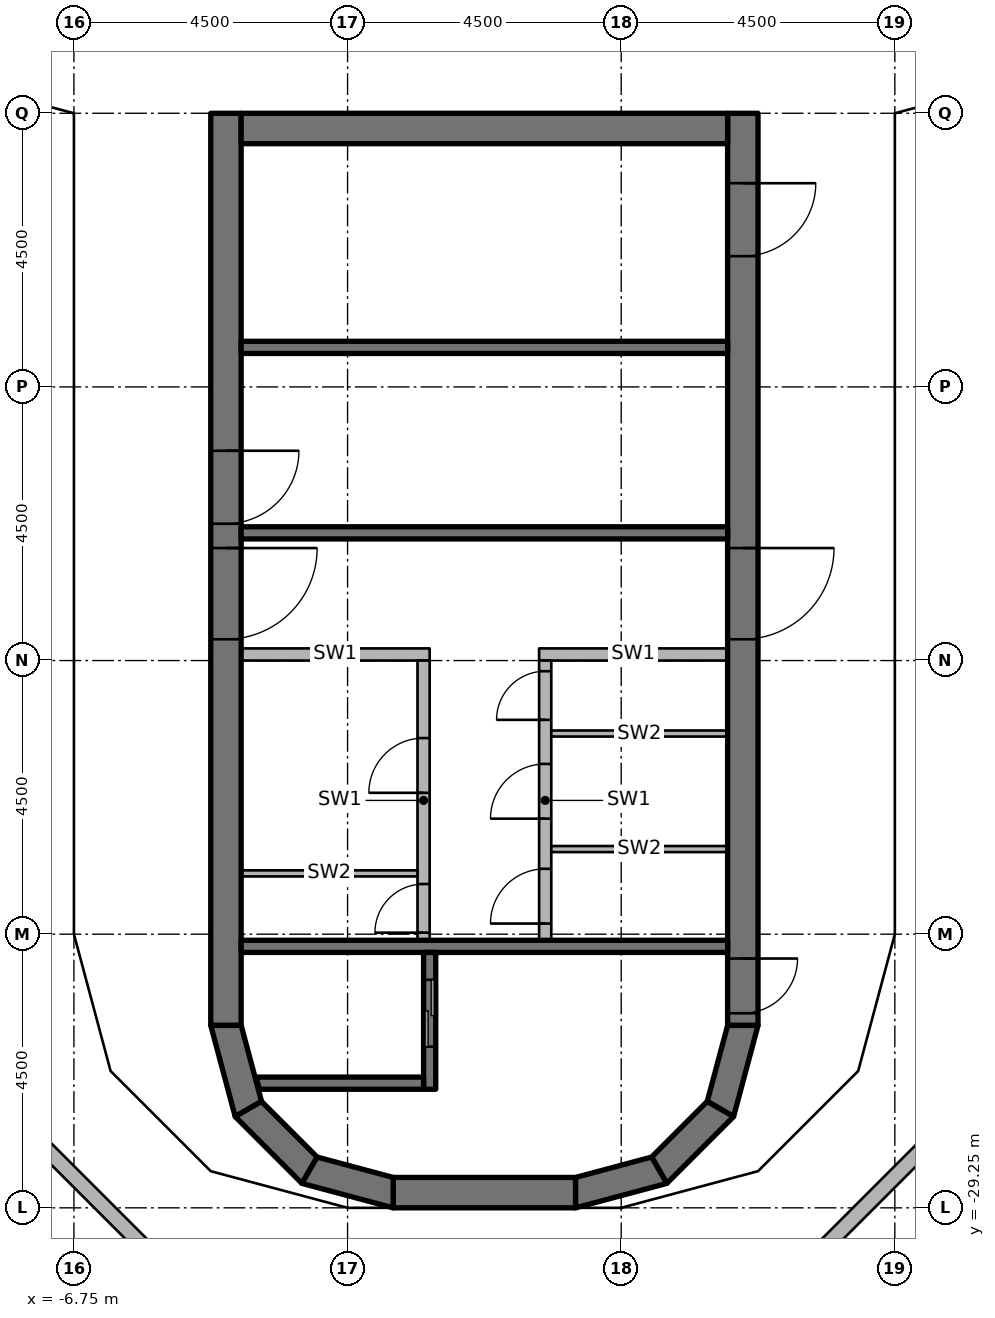
"""IFC4 building model, lengths in metres.
Left out: names, types, materials, properties, quantities, classifications, styles, units other than length and angle.
Written with IfcOpenShell. Run it as: python <this file> out.ifc"""

import sys

from ifc_helpers import new_model, si_unit, direction, frame, frame_2d, origin, origin_2d, place, context, subcontext, project, spatial, polyline, rectangle, outline, extrude, element, fill, save


model = new_model("IFC4")
c1 = context("Model", 3, precision=1e-05, world=origin(), true_north=direction((0.0, 1.0)))
c2 = subcontext(c1, "Body", "Model", "MODEL_VIEW")
j1 = project(units=[si_unit("LENGTHUNIT", "METRE"), si_unit("PLANEANGLEUNIT", "RADIAN")], contexts=[c1])
p1 = place(None, origin())
s1 = spatial("IfcSite", under=j1, at=p1, CompositionType="ELEMENT")
p2 = place(p1, origin())
s2 = spatial("IfcBuilding", under=s1, at=p2, CompositionType="ELEMENT")
p3 = place(p2, frame((0.0, 0.0, 298.8)))
s3 = spatial("IfcBuildingStorey", under=s2, at=p3, CompositionType="ELEMENT", Elevation=298.8)
for number, where, z_axis, x_axis in (
    (1, (-6.25, -24.65, 0.0), (0.0, 0.0, 1.0), (1.0, 0.0, 0.0)),
    (2, (-6.25, -20.25, 0.0), (0.0, 0.0, 1.0), (1.0, 0.0, 0.0)),
    (3, (-6.25, -15.75, 0.0), (0.0, 0.0, 1.0), (1.0, 0.0, 0.0)),
    (4, (-6.25, -10.75, 0.0), (0.0, 0.0, 1.0), (1.0, 0.0, 0.0)),
    (5, (6.25, -24.65, 0.0), (0.0, 0.0, 1.0), (1.0, 0.0, 0.0)),
    (6, (6.25, -20.25, 0.0), (0.0, 0.0, 1.0), (1.0, 0.0, 0.0)),
    (7, (6.25, -15.75, 0.0), (0.0, 0.0, 1.0), (1.0, 0.0, 0.0)),
    (8, (6.25, -10.75, 0.0), (0.0, 0.0, 1.0), (1.0, 0.0, 0.0)),
):
    element("IfcColumn", number, at=place(p3, frame(where, z_axis=z_axis, x_axis=x_axis)), inside=s3, PredefinedType="COLUMN", context=c2, shape_type="SweptSolid", body=[
        extrude(rectangle(XDim=0.6, YDim=0.6, at=origin_2d()), origin(), (0.0, 0.0, 1.0), 3.45),
    ])
p4 = place(p3, frame((-4.25, -11.25, 0.0), z_axis=(0.0, 0.0, 1.0), x_axis=(0.0, -1.0, 0.0)))
e9 = element("IfcWall", 9, at=p4, inside=s3, PredefinedType="SHEAR", context=c2, shape_type="SweptSolid", body=[
    extrude(rectangle(XDim=15.0, YDim=0.5, at=frame_2d((7.5, 0.0))), origin(), (0.0, 0.0, 1.0), 3.6),
])
p5 = place(p4, frame((7.15, 0.0, 0.0)))
e10 = element("IfcOpeningElement", 10, at=p5, cuts=e9, PredefinedType="OPENING", context=c2, shape_type="SweptSolid", body=[
    extrude(rectangle(XDim=1.5, YDim=2.3, at=frame_2d((0.75, 1.15))), frame((0.0, 0.26, 0.0), z_axis=(0.0, -1.0, 0.0), x_axis=(1.0, 0.0, 0.0)), (0.0, 0.0, 1.0), 0.52),
])
p6 = place(p4, frame((5.55, 0.0, 0.0)))
e11 = element("IfcOpeningElement", 11, at=p6, cuts=e9, PredefinedType="OPENING", context=c2, shape_type="SweptSolid", body=[
    extrude(rectangle(XDim=1.2, YDim=2.1, at=frame_2d((0.6, 1.05))), frame((0.0, 0.26, 0.0), z_axis=(0.0, -1.0, 0.0), x_axis=(1.0, 0.0, 0.0)), (0.0, 0.0, 1.0), 0.52),
])
p7 = place(p3, frame((4.25, -11.25, 0.0), z_axis=(0.0, 0.0, 1.0), x_axis=(0.0, -1.0, 0.0)))
e12 = element("IfcWall", 12, at=p7, inside=s3, PredefinedType="SHEAR", context=c2, shape_type="SweptSolid", body=[
    extrude(rectangle(XDim=15.0, YDim=0.5, at=frame_2d((7.5, 0.0))), origin(), (0.0, 0.0, 1.0), 3.6),
])
p8 = place(p7, frame((7.15, 0.0, 0.0)))
e13 = element("IfcOpeningElement", 13, at=p8, cuts=e12, PredefinedType="OPENING", context=c2, shape_type="SweptSolid", body=[
    extrude(rectangle(XDim=1.5, YDim=2.3, at=frame_2d((0.75, 1.15))), frame((0.0, 0.26, 0.0), z_axis=(0.0, -1.0, 0.0), x_axis=(1.0, 0.0, 0.0)), (0.0, 0.0, 1.0), 0.52),
])
p9 = place(p7, frame((13.9, 0.0, 0.0)))
e14 = element("IfcOpeningElement", 14, at=p9, cuts=e12, PredefinedType="OPENING", context=c2, shape_type="SweptSolid", body=[
    extrude(rectangle(XDim=0.9, YDim=2.1, at=frame_2d((0.45, 1.05))), frame((0.0, 0.26, 0.0), z_axis=(0.0, -1.0, 0.0), x_axis=(1.0, 0.0, 0.0)), (0.0, 0.0, 1.0), 0.52),
])
p10 = place(p7, frame((1.15, 0.0, 0.0)))
e15 = element("IfcOpeningElement", 15, at=p10, cuts=e12, PredefinedType="OPENING", context=c2, shape_type="SweptSolid", body=[
    extrude(rectangle(XDim=1.2, YDim=2.1, at=frame_2d((0.6, 1.05))), frame((0.0, 0.26, 0.0), z_axis=(0.0, -1.0, 0.0), x_axis=(1.0, 0.0, 0.0)), (0.0, 0.0, 1.0), 0.52),
])
p11 = place(p3, frame((-4.0, -11.5, 0.0), z_axis=(0.0, 0.0, 1.0), x_axis=(1.0, 0.0, 0.0)))
e16 = element("IfcWall", 16, at=p11, inside=s3, PredefinedType="SHEAR", context=c2, shape_type="SweptSolid", body=[
    extrude(rectangle(XDim=8.0, YDim=0.5, at=frame_2d((4.0, 0.0))), origin(), (0.0, 0.0, 1.0), 3.6),
])
p12 = place(p3, frame((-1.5, -29.0, 0.0), z_axis=(0.0, 0.0, 1.0), x_axis=(1.0, 0.0, 0.0)))
e17 = element("IfcWall", 17, at=p12, inside=s3, PredefinedType="SHEAR", context=c2, shape_type="SweptSolid", body=[
    extrude(rectangle(XDim=3.0, YDim=0.5, at=frame_2d((1.5, 0.0))), origin(), (0.0, 0.0, 1.0), 3.6),
])
p13 = place(p3, origin())
e18 = element("IfcWall", 18, at=p13, inside=s3, PredefinedType="SHEAR", context=c2, shape_type="SweptSolid", body=[
    extrude(outline(polyline([(-4.5, -26.25), (-4.098, -27.75), (-3.665, -27.5), (-4.0, -26.25), (-4.5, -26.25)])), origin(), (0.0, 0.0, 1.0), 3.6),
])
p14 = place(p3, origin())
e19 = element("IfcWall", 19, at=p14, inside=s3, PredefinedType="SHEAR", context=c2, shape_type="SweptSolid", body=[
    extrude(outline(polyline([(-4.098, -27.75), (-3.0, -28.848), (-2.75, -28.415), (-3.665, -27.5), (-4.098, -27.75)])), origin(), (0.0, 0.0, 1.0), 3.6),
])
p15 = place(p3, origin())
e20 = element("IfcWall", 20, at=p15, inside=s3, PredefinedType="SHEAR", context=c2, shape_type="SweptSolid", body=[
    extrude(outline(polyline([(-3.0, -28.848), (-1.5, -29.25), (-1.5, -28.75), (-2.75, -28.415), (-3.0, -28.848)])), origin(), (0.0, 0.0, 1.0), 3.6),
])
p16 = place(p3, origin())
e21 = element("IfcWall", 21, at=p16, inside=s3, PredefinedType="SHEAR", context=c2, shape_type="SweptSolid", body=[
    extrude(outline(polyline([(4.5, -26.25), (4.098, -27.75), (3.665, -27.5), (4.0, -26.25), (4.5, -26.25)])), origin(), (0.0, 0.0, 1.0), 3.6),
])
p17 = place(p3, origin())
e22 = element("IfcWall", 22, at=p17, inside=s3, PredefinedType="SHEAR", context=c2, shape_type="SweptSolid", body=[
    extrude(outline(polyline([(4.098, -27.75), (3.0, -28.848), (2.75, -28.415), (3.665, -27.5), (4.098, -27.75)])), origin(), (0.0, 0.0, 1.0), 3.6),
])
p18 = place(p3, origin())
e23 = element("IfcWall", 23, at=p18, inside=s3, PredefinedType="SHEAR", context=c2, shape_type="SweptSolid", body=[
    extrude(outline(polyline([(3.0, -28.848), (1.5, -29.25), (1.5, -28.75), (2.75, -28.415), (3.0, -28.848)])), origin(), (0.0, 0.0, 1.0), 3.6),
])
p19 = place(p3, origin())
e24 = element("IfcWall", 24, at=p19, inside=s3, PredefinedType="PARAPET", context=c2, shape_type="SweptSolid", body=[
    extrude(outline(polyline([(-5.421, -30.243), (-7.743, -27.921), (-7.519, -27.792), (-5.292, -30.019), (-5.421, -30.243)])), origin(), (0.0, 0.0, 1.0), 1.22),
])
p20 = place(p3, origin())
e25 = element("IfcWall", 25, at=p20, inside=s3, PredefinedType="PARAPET", context=c2, shape_type="SweptSolid", body=[
    extrude(outline(polyline([(7.743, -27.921), (5.421, -30.243), (5.292, -30.019), (7.519, -27.792), (7.743, -27.921)])), origin(), (0.0, 0.0, 1.0), 1.22),
])
p21 = place(p3, frame((4.0, -24.95, 0.0), z_axis=(0.0, 0.0, 1.0), x_axis=(-1.0, 0.0, 0.0)))
e26 = element("IfcWall", 26, at=p21, inside=s3, PredefinedType="SHEAR", context=c2, shape_type="SweptSolid", body=[
    extrude(rectangle(XDim=8.0, YDim=0.2, at=frame_2d((4.0, 0.0))), origin(), (0.0, 0.0, 1.0), 3.45),
])
p22 = place(p3, frame((-0.9, -27.3, 0.0), z_axis=(0.0, 0.0, 1.0), x_axis=(0.0, 1.0, 0.0)))
e27 = element("IfcWall", 27, at=p22, inside=s3, PredefinedType="SHEAR", context=c2, shape_type="SweptSolid", body=[
    extrude(rectangle(XDim=2.25, YDim=0.2, at=frame_2d((1.125, 0.0))), origin(), (0.0, 0.0, 1.0), 3.45),
])
p23 = place(p22, frame((0.7, 0.0, 0.0)))
e28 = element("IfcOpeningElement", 28, at=p23, cuts=e27, PredefinedType="OPENING", context=c2, shape_type="SweptSolid", body=[
    extrude(rectangle(XDim=1.1, YDim=2.3, at=frame_2d((0.55, 1.15))), frame((0.0, 0.11, 0.0), z_axis=(0.0, -1.0, 0.0), x_axis=(1.0, 0.0, 0.0)), (0.0, 0.0, 1.0), 0.22),
])
p24 = place(p3, origin())
e29 = element("IfcWall", 29, at=p24, inside=s3, PredefinedType="SHEAR", context=c2, shape_type="SweptSolid", body=[
    extrude(outline(polyline([(-1.0, -27.1), (-3.755, -27.1), (-3.701, -27.3), (-1.0, -27.3), (-1.0, -27.1)])), origin(), (0.0, 0.0, 1.0), 3.45),
])
for number, where, z_axis, x_axis in (
    (30, (4.0, -18.15, 0.0), (0.0, 0.0, 1.0), (-1.0, 0.0, 0.0)),
    (31, (4.0, -15.1, 0.0), (0.0, 0.0, 1.0), (-1.0, 0.0, 0.0)),
):
    element("IfcWall", number, at=place(p3, frame(where, z_axis=z_axis, x_axis=x_axis)), inside=s3, PredefinedType="SHEAR", context=c2, shape_type="SweptSolid", body=[
        extrude(rectangle(XDim=8.0, YDim=0.2, at=frame_2d((4.0, 0.0))), origin(), (0.0, 0.0, 1.0), 3.45),
    ])
p25 = place(p3, frame((4.0, -20.15, 0.0), z_axis=(0.0, 0.0, 1.0), x_axis=(-1.0, 0.0, 0.0)))
e32 = element("IfcWall", 32, at=p25, inside=s3, PredefinedType="PARTITIONING", context=c2, shape_type="SweptSolid", body=[
    extrude(rectangle(XDim=3.1, YDim=0.2, at=frame_2d((1.55, 0.0))), origin(), (0.0, 0.0, 1.0), 3.45),
])
p26 = place(p3, frame((1.0, -24.85, 0.0), z_axis=(0.0, 0.0, 1.0), x_axis=(0.0, 1.0, 0.0)))
e33 = element("IfcWall", 33, at=p26, inside=s3, PredefinedType="PARTITIONING", context=c2, shape_type="SweptSolid", body=[
    extrude(rectangle(XDim=4.6, YDim=0.2, at=frame_2d((2.3, 0.0))), origin(), (0.0, 0.0, 1.0), 3.45),
])
p27 = place(p26, frame((0.275, 0.0, 0.0)))
e34 = element("IfcOpeningElement", 34, at=p27, cuts=e33, PredefinedType="OPENING", context=c2, shape_type="SweptSolid", body=[
    extrude(rectangle(XDim=0.9, YDim=2.1, at=frame_2d((0.45, 1.05))), frame((0.0, 0.11, 0.0), z_axis=(0.0, -1.0, 0.0), x_axis=(1.0, 0.0, 0.0)), (0.0, 0.0, 1.0), 0.22),
])
p28 = place(p26, frame((2.0, 0.0, 0.0)))
e35 = element("IfcOpeningElement", 35, at=p28, cuts=e33, PredefinedType="OPENING", context=c2, shape_type="SweptSolid", body=[
    extrude(rectangle(XDim=0.9, YDim=2.1, at=frame_2d((0.45, 1.05))), frame((0.0, 0.11, 0.0), z_axis=(0.0, -1.0, 0.0), x_axis=(1.0, 0.0, 0.0)), (0.0, 0.0, 1.0), 0.22),
])
p29 = place(p26, frame((3.625, 0.0, 0.0)))
e36 = element("IfcOpeningElement", 36, at=p29, cuts=e33, PredefinedType="OPENING", context=c2, shape_type="SweptSolid", body=[
    extrude(rectangle(XDim=0.8, YDim=2.1, at=frame_2d((0.4, 1.05))), frame((0.0, 0.11, 0.0), z_axis=(0.0, -1.0, 0.0), x_axis=(1.0, 0.0, 0.0)), (0.0, 0.0, 1.0), 0.22),
])
p30 = place(p3, frame((-0.9, -20.15, 0.0), z_axis=(0.0, 0.0, 1.0), x_axis=(-1.0, 0.0, 0.0)))
e37 = element("IfcWall", 37, at=p30, inside=s3, PredefinedType="PARTITIONING", context=c2, shape_type="SweptSolid", body=[
    extrude(rectangle(XDim=3.1, YDim=0.2, at=frame_2d((1.55, 0.0))), origin(), (0.0, 0.0, 1.0), 3.45),
])
p31 = place(p3, frame((-1.0, -24.85, 0.0), z_axis=(0.0, 0.0, 1.0), x_axis=(0.0, 1.0, 0.0)))
e38 = element("IfcWall", 38, at=p31, inside=s3, PredefinedType="PARTITIONING", context=c2, shape_type="SweptSolid", body=[
    extrude(rectangle(XDim=4.6, YDim=0.2, at=frame_2d((2.3, 0.0))), origin(), (0.0, 0.0, 1.0), 3.45),
])
p32 = place(p31, frame((0.125, 0.0, 0.0)))
e39 = element("IfcOpeningElement", 39, at=p32, cuts=e38, PredefinedType="OPENING", context=c2, shape_type="SweptSolid", body=[
    extrude(rectangle(XDim=0.8, YDim=2.1, at=frame_2d((0.4, 1.05))), frame((0.0, 0.11, 0.0), z_axis=(0.0, -1.0, 0.0), x_axis=(1.0, 0.0, 0.0)), (0.0, 0.0, 1.0), 0.22),
])
p33 = place(p31, frame((2.425, 0.0, 0.0)))
e40 = element("IfcOpeningElement", 40, at=p33, cuts=e38, PredefinedType="OPENING", context=c2, shape_type="SweptSolid", body=[
    extrude(rectangle(XDim=0.9, YDim=2.1, at=frame_2d((0.45, 1.05))), frame((0.0, 0.11, 0.0), z_axis=(0.0, -1.0, 0.0), x_axis=(1.0, 0.0, 0.0)), (0.0, 0.0, 1.0), 0.22),
])
for number, where, z_axis, x_axis in (
    (41, (4.0, -23.35, 0.0), (0.0, 0.0, 1.0), (-1.0, 0.0, 0.0)),
    (42, (4.0, -21.45, 0.0), (0.0, 0.0, 1.0), (-1.0, 0.0, 0.0)),
    (43, (-1.1, -23.75, 0.0), (0.0, 0.0, 1.0), (-1.0, 0.0, 0.0)),
):
    element("IfcWall", number, at=place(p3, frame(where, z_axis=z_axis, x_axis=x_axis)), inside=s3, PredefinedType="PARTITIONING", context=c2, shape_type="SweptSolid", body=[
        extrude(rectangle(XDim=2.9, YDim=0.1, at=frame_2d((1.45, 0.0))), origin(), (0.0, 0.0, 1.0), 3.45),
    ])
p34 = place(p8, origin())
e44 = element("IfcDoor", 44, at=p34, inside=s3, OperationType="DOUBLE_DOOR_SINGLE_SWING", PredefinedType="DOOR", context=c2, shape_type="SweptSolid", body=[
    extrude(rectangle(XDim=1.5, YDim=2.3, at=frame_2d((0.75, 1.15))), frame((0.0, 0.025, 0.0), z_axis=(0.0, -1.0, 0.0), x_axis=(1.0, 0.0, 0.0)), (0.0, 0.0, 1.0), 0.05),
])
fill(e13, e44)
p35 = place(p5, origin())
e45 = element("IfcDoor", 45, at=p35, inside=s3, OperationType="DOUBLE_DOOR_SINGLE_SWING", PredefinedType="DOOR", context=c2, shape_type="SweptSolid", body=[
    extrude(rectangle(XDim=1.5, YDim=2.3, at=frame_2d((0.75, 1.15))), frame((0.0, 0.025, 0.0), z_axis=(0.0, -1.0, 0.0), x_axis=(1.0, 0.0, 0.0)), (0.0, 0.0, 1.0), 0.05),
])
fill(e10, e45)
p36 = place(p9, origin())
e46 = element("IfcDoor", 46, at=p36, inside=s3, OperationType="SINGLE_SWING_RIGHT", PredefinedType="DOOR", context=c2, shape_type="SweptSolid", body=[
    extrude(rectangle(XDim=0.9, YDim=2.1, at=frame_2d((0.45, 1.05))), frame((0.0, 0.025, 0.0), z_axis=(0.0, -1.0, 0.0), x_axis=(1.0, 0.0, 0.0)), (0.0, 0.0, 1.0), 0.05),
])
fill(e14, e46)
p37 = place(p6, origin())
e47 = element("IfcDoor", 47, at=p37, inside=s3, OperationType="SINGLE_SWING_LEFT", PredefinedType="DOOR", context=c2, shape_type="SweptSolid", body=[
    extrude(rectangle(XDim=1.2, YDim=2.1, at=frame_2d((0.6, 1.05))), frame((0.0, 0.025, 0.0), z_axis=(0.0, -1.0, 0.0), x_axis=(1.0, 0.0, 0.0)), (0.0, 0.0, 1.0), 0.05),
])
fill(e11, e47)
p38 = place(p10, origin())
e48 = element("IfcDoor", 48, at=p38, inside=s3, OperationType="SINGLE_SWING_LEFT", PredefinedType="DOOR", context=c2, shape_type="SweptSolid", body=[
    extrude(rectangle(XDim=1.2, YDim=2.1, at=frame_2d((0.6, 1.05))), frame((0.0, 0.025, 0.0), z_axis=(0.0, -1.0, 0.0), x_axis=(1.0, 0.0, 0.0)), (0.0, 0.0, 1.0), 0.05),
])
fill(e15, e48)
p39 = place(p23, origin())
e49 = element("IfcDoor", 49, at=p39, inside=s3, OperationType="DOUBLE_DOOR_SLIDING", PredefinedType="DOOR", context=c2, shape_type="SweptSolid", body=[
    extrude(rectangle(XDim=1.1, YDim=2.3, at=frame_2d((0.55, 1.15))), frame((0.0, 0.025, 0.0), z_axis=(0.0, -1.0, 0.0), x_axis=(1.0, 0.0, 0.0)), (0.0, 0.0, 1.0), 0.05),
])
fill(e28, e49)
p40 = place(p27, origin())
e50 = element("IfcDoor", 50, at=p40, inside=s3, OperationType="SINGLE_SWING_RIGHT", PredefinedType="DOOR", context=c2, shape_type="SweptSolid", body=[
    extrude(rectangle(XDim=0.9, YDim=2.1, at=frame_2d((0.45, 1.05))), frame((0.0, 0.025, 0.0), z_axis=(0.0, -1.0, 0.0), x_axis=(1.0, 0.0, 0.0)), (0.0, 0.0, 1.0), 0.05),
])
fill(e34, e50)
p41 = place(p28, origin())
e51 = element("IfcDoor", 51, at=p41, inside=s3, OperationType="SINGLE_SWING_RIGHT", PredefinedType="DOOR", context=c2, shape_type="SweptSolid", body=[
    extrude(rectangle(XDim=0.9, YDim=2.1, at=frame_2d((0.45, 1.05))), frame((0.0, 0.025, 0.0), z_axis=(0.0, -1.0, 0.0), x_axis=(1.0, 0.0, 0.0)), (0.0, 0.0, 1.0), 0.05),
])
fill(e35, e51)
p42 = place(p29, origin())
e52 = element("IfcDoor", 52, at=p42, inside=s3, OperationType="SINGLE_SWING_RIGHT", PredefinedType="DOOR", context=c2, shape_type="SweptSolid", body=[
    extrude(rectangle(XDim=0.8, YDim=2.1, at=frame_2d((0.4, 1.05))), frame((0.0, 0.025, 0.0), z_axis=(0.0, -1.0, 0.0), x_axis=(1.0, 0.0, 0.0)), (0.0, 0.0, 1.0), 0.05),
])
fill(e36, e52)
p43 = place(p32, origin())
e53 = element("IfcDoor", 53, at=p43, inside=s3, OperationType="SINGLE_SWING_RIGHT", PredefinedType="DOOR", context=c2, shape_type="SweptSolid", body=[
    extrude(rectangle(XDim=0.8, YDim=2.1, at=frame_2d((0.4, 1.05))), frame((0.0, 0.025, 0.0), z_axis=(0.0, -1.0, 0.0), x_axis=(1.0, 0.0, 0.0)), (0.0, 0.0, 1.0), 0.05),
])
fill(e39, e53)
p44 = place(p33, origin())
e54 = element("IfcDoor", 54, at=p44, inside=s3, OperationType="SINGLE_SWING_LEFT", PredefinedType="DOOR", context=c2, shape_type="SweptSolid", body=[
    extrude(rectangle(XDim=0.9, YDim=2.1, at=frame_2d((0.45, 1.05))), frame((0.0, 0.025, 0.0), z_axis=(0.0, -1.0, 0.0), x_axis=(1.0, 0.0, 0.0)), (0.0, 0.0, 1.0), 0.05),
])
fill(e40, e54)
save(model, sys.argv[1])
